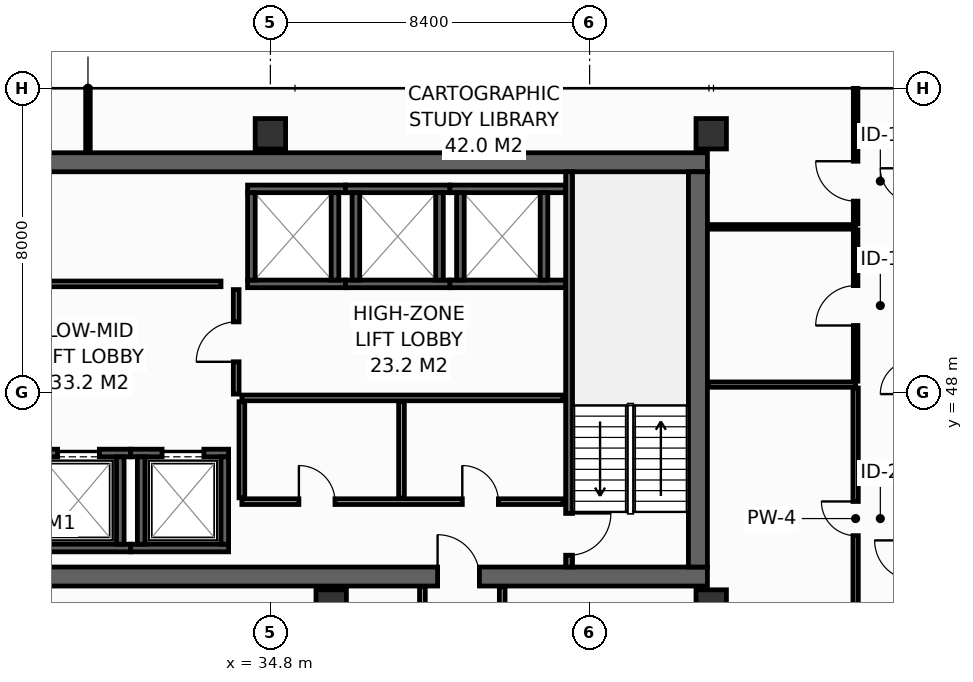
"""IFC4 building model, lengths in metres.
Left out: names, types, materials, properties, quantities, classifications, styles, units other than length and angle.
Written with IfcOpenShell. Run it as: python <this file> out.ifc"""

import sys

from ifc_helpers import new_model, si_unit, direction, frame, frame_2d, origin, origin_2d, place, context, subcontext, project, spatial, rectangle, hollow_rectangle, extrude, element, fill, save


model = new_model("IFC4")
c1 = context("Model", 3, precision=1e-05, world=origin(), true_north=direction((0.0, 1.0)))
c2 = subcontext(c1, "Body", "Model", "MODEL_VIEW")
j1 = project(units=[si_unit("LENGTHUNIT", "METRE"), si_unit("PLANEANGLEUNIT", "RADIAN")], contexts=[c1])
p1 = place(None, origin())
s1 = spatial("IfcSite", under=j1, at=p1, CompositionType="ELEMENT")
p2 = place(p1, origin())
s2 = spatial("IfcBuilding", under=s1, at=p2, CompositionType="ELEMENT")
p3 = place(p2, frame((0.0, 0.0, 190.4)))
s3 = spatial("IfcBuildingStorey", under=s2, at=p3, CompositionType="ELEMENT", Elevation=190.4)
p4 = place(p3, frame((13.6, 43.15, 0.0), z_axis=(0.0, 0.0, 1.0), x_axis=(1.0, 0.0, 0.0)))
e1 = element("IfcWall", 1, at=p4, inside=s3, PredefinedType="SHEAR", context=c2, shape_type="SweptSolid", body=[
    extrude(rectangle(XDim=32.7, YDim=0.5, at=frame_2d((16.35, 0.0))), origin(), (0.0, 0.0, 1.0), 3.55),
])
p5 = place(p4, frame((5.4, 0.0, 0.0)))
e2 = element("IfcOpeningElement", 2, at=p5, cuts=e1, PredefinedType="OPENING", context=c2, shape_type="SweptSolid", body=[
    extrude(rectangle(XDim=1.1, YDim=2.15, at=frame_2d((0.55, 1.075))), frame((0.0, 0.26, 0.0), z_axis=(0.0, -1.0, 0.0), x_axis=(1.0, 0.0, 0.0)), (0.0, 0.0, 1.0), 0.52),
])
p6 = place(p4, frame((25.6, 0.0, 0.0)))
e3 = element("IfcOpeningElement", 3, at=p6, cuts=e1, PredefinedType="OPENING", context=c2, shape_type="SweptSolid", body=[
    extrude(rectangle(XDim=1.1, YDim=2.15, at=frame_2d((0.55, 1.075))), frame((0.0, 0.26, 0.0), z_axis=(0.0, -1.0, 0.0), x_axis=(1.0, 0.0, 0.0)), (0.0, 0.0, 1.0), 0.52),
])
p7 = place(p3, frame((13.6, 54.05, 0.0), z_axis=(0.0, 0.0, 1.0), x_axis=(1.0, 0.0, 0.0)))
e4 = element("IfcWall", 4, at=p7, inside=s3, PredefinedType="SHEAR", context=c2, shape_type="SweptSolid", body=[
    extrude(rectangle(XDim=32.7, YDim=0.5, at=frame_2d((16.35, 0.0))), origin(), (0.0, 0.0, 1.0), 3.55),
])
p8 = place(p3, frame((46.05, 43.4, 0.0), z_axis=(0.0, 0.0, 1.0), x_axis=(0.0, 1.0, 0.0)))
e5 = element("IfcWall", 5, at=p8, inside=s3, PredefinedType="SHEAR", context=c2, shape_type="SweptSolid", body=[
    extrude(rectangle(XDim=10.4, YDim=0.5, at=frame_2d((5.2, 0.0))), origin(), (0.0, 0.0, 1.0), 3.55),
])
for number, where, z_axis, x_axis in (
    (6, (34.8, 54.8, 0.0), (0.0, 0.0, 1.0), (1.0, 0.0, 0.0)),
    (7, (46.4, 54.8, 0.0), (0.0, 0.0, 1.0), (1.0, 0.0, 0.0)),
    (8, (36.4, 42.4, 0.0), (0.0, 0.0, 1.0), (1.0, 0.0, 0.0)),
    (9, (46.4, 42.4, 0.0), (0.0, 0.0, 1.0), (1.0, 0.0, 0.0)),
):
    element("IfcColumn", number, at=place(p3, frame(where, z_axis=z_axis, x_axis=x_axis)), inside=s3, PredefinedType="COLUMN", context=c2, shape_type="SweptSolid", body=[
        extrude(hollow_rectangle(XDim=0.8, YDim=0.8, WallThickness=0.036, at=origin_2d()), origin(), (0.0, 0.0, 1.0), 3.8),
    ])
p9 = place(p3, frame((28.375, 43.9, 0.0), z_axis=(0.0, 0.0, 1.0), x_axis=(1.0, 0.0, 0.0)))
e10 = element("IfcWall", 10, at=p9, inside=s3, PredefinedType="SHEAR", context=c2, shape_type="SweptSolid", body=[
    extrude(rectangle(XDim=2.75, YDim=0.2, at=frame_2d((1.375, 0.0))), origin(), (0.0, 0.0, 1.0), 3.55),
])
p10 = place(p3, frame((28.375, 46.4, 0.0), z_axis=(0.0, 0.0, 1.0), x_axis=(1.0, 0.0, 0.0)))
e11 = element("IfcWall", 11, at=p10, inside=s3, PredefinedType="SHEAR", context=c2, shape_type="SweptSolid", body=[
    extrude(rectangle(XDim=2.75, YDim=0.2, at=frame_2d((1.375, 0.0))), origin(), (0.0, 0.0, 1.0), 3.55),
])
p11 = place(p10, frame((0.825, 0.0, 0.0)))
e12 = element("IfcOpeningElement", 12, at=p11, cuts=e11, PredefinedType="OPENING", context=c2, shape_type="SweptSolid", body=[
    extrude(rectangle(XDim=1.1, YDim=2.2, at=frame_2d((0.55, 1.1))), frame((0.0, 0.11, 0.0), z_axis=(0.0, -1.0, 0.0), x_axis=(1.0, 0.0, 0.0)), (0.0, 0.0, 1.0), 0.22),
])
p12 = place(p3, frame((30.85, 44.0, 0.0), z_axis=(0.0, 0.0, 1.0), x_axis=(0.0, 1.0, 0.0)))
e13 = element("IfcWall", 13, at=p12, inside=s3, PredefinedType="SHEAR", context=c2, shape_type="SweptSolid", body=[
    extrude(rectangle(XDim=2.3, YDim=0.2, at=frame_2d((1.15, 0.0))), origin(), (0.0, 0.0, 1.0), 3.55),
])
p13 = place(p3, frame((31.125, 43.9, 0.0), z_axis=(0.0, 0.0, 1.0), x_axis=(1.0, 0.0, 0.0)))
e14 = element("IfcWall", 14, at=p13, inside=s3, PredefinedType="SHEAR", context=c2, shape_type="SweptSolid", body=[
    extrude(rectangle(XDim=2.575, YDim=0.2, at=frame_2d((1.288, 0.0))), origin(), (0.0, 0.0, 1.0), 3.55),
])
p14 = place(p3, frame((31.125, 46.4, 0.0), z_axis=(0.0, 0.0, 1.0), x_axis=(1.0, 0.0, 0.0)))
e15 = element("IfcWall", 15, at=p14, inside=s3, PredefinedType="SHEAR", context=c2, shape_type="SweptSolid", body=[
    extrude(rectangle(XDim=2.575, YDim=0.2, at=frame_2d((1.288, 0.0))), origin(), (0.0, 0.0, 1.0), 3.55),
])
p15 = place(p14, frame((0.825, 0.0, 0.0)))
e16 = element("IfcOpeningElement", 16, at=p15, cuts=e15, PredefinedType="OPENING", context=c2, shape_type="SweptSolid", body=[
    extrude(rectangle(XDim=1.1, YDim=2.2, at=frame_2d((0.55, 1.1))), frame((0.0, 0.11, 0.0), z_axis=(0.0, -1.0, 0.0), x_axis=(1.0, 0.0, 0.0)), (0.0, 0.0, 1.0), 0.22),
])
for number, where, z_axis, x_axis in (
    (17, (31.4, 44.0, 0.0), (0.0, 0.0, 1.0), (0.0, 1.0, 0.0)),
    (18, (33.6, 44.0, 0.0), (0.0, 0.0, 1.0), (0.0, 1.0, 0.0)),
):
    element("IfcWall", number, at=place(p3, frame(where, z_axis=z_axis, x_axis=x_axis)), inside=s3, PredefinedType="SHEAR", context=c2, shape_type="SweptSolid", body=[
        extrude(rectangle(XDim=2.3, YDim=0.2, at=frame_2d((1.15, 0.0))), origin(), (0.0, 0.0, 1.0), 3.55),
    ])
for number, where, z_axis, x_axis in (
    (19, (34.2, 50.85, 0.0), (0.0, 0.0, 1.0), (1.0, 0.0, 0.0)),
    (20, (34.2, 53.35, 0.0), (0.0, 0.0, 1.0), (1.0, 0.0, 0.0)),
):
    element("IfcWall", number, at=place(p3, frame(where, z_axis=z_axis, x_axis=x_axis)), inside=s3, PredefinedType="SHEAR", context=c2, shape_type="SweptSolid", body=[
        extrude(rectangle(XDim=2.575, YDim=0.2, at=frame_2d((1.288, 0.0))), origin(), (0.0, 0.0, 1.0), 3.55),
    ])
for number, where, z_axis, x_axis in (
    (21, (34.3, 50.95, 0.0), (0.0, 0.0, 1.0), (0.0, 1.0, 0.0)),
    (22, (36.5, 50.95, 0.0), (0.0, 0.0, 1.0), (0.0, 1.0, 0.0)),
):
    element("IfcWall", number, at=place(p3, frame(where, z_axis=z_axis, x_axis=x_axis)), inside=s3, PredefinedType="SHEAR", context=c2, shape_type="SweptSolid", body=[
        extrude(rectangle(XDim=2.3, YDim=0.2, at=frame_2d((1.15, 0.0))), origin(), (0.0, 0.0, 1.0), 3.55),
    ])
for number, where, z_axis, x_axis in (
    (23, (36.775, 50.85, 0.0), (0.0, 0.0, 1.0), (1.0, 0.0, 0.0)),
    (24, (36.775, 53.35, 0.0), (0.0, 0.0, 1.0), (1.0, 0.0, 0.0)),
):
    element("IfcWall", number, at=place(p3, frame(where, z_axis=z_axis, x_axis=x_axis)), inside=s3, PredefinedType="SHEAR", context=c2, shape_type="SweptSolid", body=[
        extrude(rectangle(XDim=2.75, YDim=0.2, at=frame_2d((1.375, 0.0))), origin(), (0.0, 0.0, 1.0), 3.55),
    ])
for number, where, z_axis, x_axis in (
    (25, (37.05, 50.95, 0.0), (0.0, 0.0, 1.0), (0.0, 1.0, 0.0)),
    (26, (39.25, 50.95, 0.0), (0.0, 0.0, 1.0), (0.0, 1.0, 0.0)),
):
    element("IfcWall", number, at=place(p3, frame(where, z_axis=z_axis, x_axis=x_axis)), inside=s3, PredefinedType="SHEAR", context=c2, shape_type="SweptSolid", body=[
        extrude(rectangle(XDim=2.3, YDim=0.2, at=frame_2d((1.15, 0.0))), origin(), (0.0, 0.0, 1.0), 3.55),
    ])
for number, where, z_axis, x_axis in (
    (27, (39.525, 50.85, 0.0), (0.0, 0.0, 1.0), (1.0, 0.0, 0.0)),
    (28, (39.525, 53.35, 0.0), (0.0, 0.0, 1.0), (1.0, 0.0, 0.0)),
):
    element("IfcWall", number, at=place(p3, frame(where, z_axis=z_axis, x_axis=x_axis)), inside=s3, PredefinedType="SHEAR", context=c2, shape_type="SweptSolid", body=[
        extrude(rectangle(XDim=3.045, YDim=0.2, at=frame_2d((1.522, 0.0))), origin(), (0.0, 0.0, 1.0), 3.55),
    ])
for number, where, z_axis, x_axis in (
    (29, (39.8, 50.95, 0.0), (0.0, 0.0, 1.0), (0.0, 1.0, 0.0)),
    (30, (42.0, 50.95, 0.0), (0.0, 0.0, 1.0), (0.0, 1.0, 0.0)),
):
    element("IfcWall", number, at=place(p3, frame(where, z_axis=z_axis, x_axis=x_axis)), inside=s3, PredefinedType="SHEAR", context=c2, shape_type="SweptSolid", body=[
        extrude(rectangle(XDim=2.3, YDim=0.2, at=frame_2d((1.15, 0.0))), origin(), (0.0, 0.0, 1.0), 3.55),
    ])
p16 = place(p3, frame((42.66, 53.8, 0.0), z_axis=(0.0, 0.0, 1.0), x_axis=(0.0, -1.0, 0.0)))
e31 = element("IfcWall", 31, at=p16, inside=s3, PredefinedType="SHEAR", context=c2, shape_type="SweptSolid", body=[
    extrude(rectangle(XDim=10.4, YDim=0.18, at=frame_2d((5.2, 0.0))), origin(), (0.0, 0.0, 1.0), 3.55),
])
p17 = place(p16, frame((8.99, 0.0, 0.0)))
e32 = element("IfcOpeningElement", 32, at=p17, cuts=e31, PredefinedType="OPENING", context=c2, shape_type="SweptSolid", body=[
    extrude(rectangle(XDim=1.1, YDim=2.15, at=frame_2d((0.55, 1.075))), frame((0.0, 0.1, 0.0), z_axis=(0.0, -1.0, 0.0), x_axis=(1.0, 0.0, 0.0)), (0.0, 0.0, 1.0), 0.2),
])
p18 = place(p3, frame((33.9, 47.95, 0.0), z_axis=(0.0, 0.0, 1.0), x_axis=(0.0, 1.0, 0.0)))
e33 = element("IfcWall", 33, at=p18, inside=s3, PredefinedType="PARTITIONING", context=c2, shape_type="SweptSolid", body=[
    extrude(rectangle(XDim=2.75, YDim=0.15, at=frame_2d((1.375, 0.0))), origin(), (0.0, 0.0, 1.0), 3.55),
])
p19 = place(p18, frame((0.85, 0.0, 0.0)))
e34 = element("IfcOpeningElement", 34, at=p19, cuts=e33, PredefinedType="OPENING", context=c2, shape_type="SweptSolid", body=[
    extrude(rectangle(XDim=1.05, YDim=2.15, at=frame_2d((0.525, 1.075))), frame((0.0, 0.085, 0.0), z_axis=(0.0, -1.0, 0.0), x_axis=(1.0, 0.0, 0.0)), (0.0, 0.0, 1.0), 0.17),
])
p20 = place(p3, frame((34.05, 45.12, 0.0), z_axis=(0.0, 0.0, 1.0), x_axis=(1.0, 0.0, 0.0)))
e35 = element("IfcWall", 35, at=p20, inside=s3, PredefinedType="PARTITIONING", context=c2, shape_type="SweptSolid", body=[
    extrude(rectangle(XDim=8.45, YDim=0.15, at=frame_2d((4.225, 0.0))), origin(), (0.0, 0.0, 1.0), 3.55),
])
p21 = place(p20, frame((1.5, 0.0, 0.0)))
e36 = element("IfcOpeningElement", 36, at=p21, cuts=e35, PredefinedType="OPENING", context=c2, shape_type="SweptSolid", body=[
    extrude(rectangle(XDim=0.95, YDim=2.15, at=frame_2d((0.475, 1.075))), frame((0.0, 0.085, 0.0), z_axis=(0.0, -1.0, 0.0), x_axis=(1.0, 0.0, 0.0)), (0.0, 0.0, 1.0), 0.17),
])
p22 = place(p20, frame((5.8, 0.0, 0.0)))
e37 = element("IfcOpeningElement", 37, at=p22, cuts=e35, PredefinedType="OPENING", context=c2, shape_type="SweptSolid", body=[
    extrude(rectangle(XDim=0.95, YDim=2.15, at=frame_2d((0.475, 1.075))), frame((0.0, 0.085, 0.0), z_axis=(0.0, -1.0, 0.0), x_axis=(1.0, 0.0, 0.0)), (0.0, 0.0, 1.0), 0.17),
])
p23 = place(p3, frame((34.05, 47.85, 0.0), z_axis=(0.0, 0.0, 1.0), x_axis=(1.0, 0.0, 0.0)))
e38 = element("IfcWall", 38, at=p23, inside=s3, PredefinedType="PARTITIONING", context=c2, shape_type="SweptSolid", body=[
    extrude(rectangle(XDim=8.45, YDim=0.15, at=frame_2d((4.225, 0.0))), origin(), (0.0, 0.0, 1.0), 3.55),
])
for number, where, z_axis, x_axis in (
    (39, (38.25, 45.22, 0.0), (0.0, 0.0, 1.0), (0.0, 1.0, 0.0)),
    (40, (34.05, 45.22, 0.0), (0.0, 0.0, 1.0), (0.0, 1.0, 0.0)),
):
    element("IfcWall", number, at=place(p3, frame(where, z_axis=z_axis, x_axis=x_axis)), inside=s3, PredefinedType="PARTITIONING", context=c2, shape_type="SweptSolid", body=[
        extrude(rectangle(XDim=2.53, YDim=0.15, at=frame_2d((1.265, 0.0))), origin(), (0.0, 0.0, 1.0), 3.55),
    ])
p24 = place(p3, frame((25.85, 50.85, 0.0), z_axis=(0.0, 0.0, 1.0), x_axis=(1.0, 0.0, 0.0)))
e41 = element("IfcWall", 41, at=p24, inside=s3, PredefinedType="PARTITIONING", context=c2, shape_type="SweptSolid", body=[
    extrude(rectangle(XDim=7.65, YDim=0.15, at=frame_2d((3.825, 0.0))), origin(), (0.0, 0.0, 1.0), 3.55),
])
p25 = place(p24, frame((1.25, 0.0, 0.0)))
e42 = element("IfcOpeningElement", 42, at=p25, cuts=e41, PredefinedType="OPENING", context=c2, shape_type="SweptSolid", body=[
    extrude(rectangle(XDim=0.95, YDim=2.15, at=frame_2d((0.475, 1.075))), frame((0.0, 0.085, 0.0), z_axis=(0.0, -1.0, 0.0), x_axis=(1.0, 0.0, 0.0)), (0.0, 0.0, 1.0), 0.17),
])
p26 = place(p3, frame((46.15, 41.24, 0.0), z_axis=(0.0, 0.0, 1.0), x_axis=(0.0, 1.0, 0.0)))
e43 = element("IfcWall", 43, at=p26, inside=s3, PredefinedType="PARTITIONING", context=c2, shape_type="SweptSolid", body=[
    extrude(rectangle(XDim=1.64, YDim=0.14, at=frame_2d((0.82, 0.0))), origin(), (0.0, 0.0, 1.0), 3.55),
])
p27 = place(p3, frame((46.32, 48.2, 0.0), z_axis=(0.0, 0.0, 1.0), x_axis=(1.0, 0.0, 0.0)))
e44 = element("IfcWall", 44, at=p27, inside=s3, PredefinedType="PARTITIONING", context=c2, shape_type="SweptSolid", body=[
    extrude(rectangle(XDim=3.88, YDim=0.14, at=frame_2d((1.94, 0.0))), origin(), (0.0, 0.0, 1.0), 3.55),
])
p28 = place(p3, frame((50.2, 41.24, 0.0), z_axis=(0.0, 0.0, 1.0), x_axis=(0.0, 1.0, 0.0)))
e45 = element("IfcWall", 45, at=p28, inside=s3, PredefinedType="PARTITIONING", context=c2, shape_type="SweptSolid", body=[
    extrude(rectangle(XDim=6.87, YDim=0.14, at=frame_2d((3.435, 0.0))), origin(), (0.0, 0.0, 1.0), 2.835),
])
p29 = place(p28, frame((2.985, 0.0, 0.0)))
e46 = element("IfcOpeningElement", 46, at=p29, cuts=e45, PredefinedType="OPENING", context=c2, shape_type="SweptSolid", body=[
    extrude(rectangle(XDim=0.9, YDim=2.1, at=frame_2d((0.45, 1.05))), frame((0.0, 0.08, 0.0), z_axis=(0.0, -1.0, 0.0), x_axis=(1.0, 0.0, 0.0)), (0.0, 0.0, 1.0), 0.16),
])
p30 = place(p3, frame((46.32, 52.35, 0.0), z_axis=(0.0, 0.0, 1.0), x_axis=(1.0, 0.0, 0.0)))
e47 = element("IfcWall", 47, at=p30, inside=s3, PredefinedType="PARTITIONING", context=c2, shape_type="SweptSolid", body=[
    extrude(rectangle(XDim=3.88, YDim=0.12, at=frame_2d((1.94, 0.0))), origin(), (0.0, 0.0, 1.0), 3.55),
])
p31 = place(p3, frame((30.0, 54.32, 0.0), z_axis=(0.0, 0.0, 1.0), x_axis=(0.0, 1.0, 0.0)))
e48 = element("IfcWall", 48, at=p31, inside=s3, PredefinedType="PARTITIONING", context=c2, shape_type="SweptSolid", body=[
    extrude(rectangle(XDim=1.675, YDim=0.12, at=frame_2d((0.837, 0.0))), origin(), (0.0, 0.0, 1.0), 2.935),
])
p32 = place(p3, frame((50.2, 48.29, 0.0), z_axis=(0.0, 0.0, 1.0), x_axis=(0.0, 1.0, 0.0)))
e49 = element("IfcWall", 49, at=p32, inside=s3, PredefinedType="PARTITIONING", context=c2, shape_type="SweptSolid", body=[
    extrude(rectangle(XDim=3.98, YDim=0.12, at=frame_2d((1.99, 0.0))), origin(), (0.0, 0.0, 1.0), 3.55),
])
p33 = place(p32, frame((1.465, 0.0, 0.0)))
e50 = element("IfcOpeningElement", 50, at=p33, cuts=e49, PredefinedType="OPENING", context=c2, shape_type="SweptSolid", body=[
    extrude(rectangle(XDim=1.05, YDim=2.15, at=frame_2d((0.525, 1.075))), frame((0.0, 0.07, 0.0), z_axis=(0.0, -1.0, 0.0), x_axis=(1.0, 0.0, 0.0)), (0.0, 0.0, 1.0), 0.14),
])
p34 = place(p3, frame((50.2, 52.43, 0.0), z_axis=(0.0, 0.0, 1.0), x_axis=(0.0, 1.0, 0.0)))
e51 = element("IfcWall", 51, at=p34, inside=s3, PredefinedType="PARTITIONING", context=c2, shape_type="SweptSolid", body=[
    extrude(rectangle(XDim=3.565, YDim=0.12, at=frame_2d((1.783, 0.0))), origin(), (0.0, 0.0, 1.0), 2.935),
])
p35 = place(p34, frame((0.597, 0.0, 0.0)))
e52 = element("IfcOpeningElement", 52, at=p35, cuts=e51, PredefinedType="OPENING", context=c2, shape_type="SweptSolid", body=[
    extrude(rectangle(XDim=1.05, YDim=2.15, at=frame_2d((0.525, 1.075))), frame((0.0, 0.07, 0.0), z_axis=(0.0, -1.0, 0.0), x_axis=(1.0, 0.0, 0.0)), (0.0, 0.0, 1.0), 0.14),
])
for number, where, z_axis, x_axis in (
    (53, (38.8, 41.15, 0.0), (0.0, 0.0, 1.0), (0.0, 1.0, 0.0)),
    (54, (40.9, 41.15, 0.0), (0.0, 0.0, 1.0), (0.0, 1.0, 0.0)),
):
    element("IfcWall", number, at=place(p3, frame(where, z_axis=z_axis, x_axis=x_axis)), inside=s3, PredefinedType="PARTITIONING", context=c2, shape_type="SweptSolid", body=[
        extrude(rectangle(XDim=1.73, YDim=0.15, at=frame_2d((0.865, 0.0))), origin(), (0.0, 0.0, 1.0), 3.55),
    ])
p36 = place(p11, origin())
e55 = element("IfcDoor", 55, at=p36, inside=s3, OperationType="SLIDING_TO_LEFT", PredefinedType="DOOR", context=c2, shape_type="SweptSolid", body=[
    extrude(rectangle(XDim=1.1, YDim=2.2, at=frame_2d((0.55, 1.1))), frame((0.0, 0.025, 0.0), z_axis=(0.0, -1.0, 0.0), x_axis=(1.0, 0.0, 0.0)), (0.0, 0.0, 1.0), 0.05),
])
fill(e12, e55)
p37 = place(p15, origin())
e56 = element("IfcDoor", 56, at=p37, inside=s3, OperationType="SLIDING_TO_LEFT", PredefinedType="DOOR", context=c2, shape_type="SweptSolid", body=[
    extrude(rectangle(XDim=1.1, YDim=2.2, at=frame_2d((0.55, 1.1))), frame((0.0, 0.025, 0.0), z_axis=(0.0, -1.0, 0.0), x_axis=(1.0, 0.0, 0.0)), (0.0, 0.0, 1.0), 0.05),
])
fill(e16, e56)
p38 = place(p17, origin())
e57 = element("IfcDoor", 57, at=p38, inside=s3, OperationType="SINGLE_SWING_LEFT", PredefinedType="DOOR", context=c2, shape_type="SweptSolid", body=[
    extrude(rectangle(XDim=1.1, YDim=2.15, at=frame_2d((0.55, 1.075))), frame((0.0, 0.025, 0.0), z_axis=(0.0, -1.0, 0.0), x_axis=(1.0, 0.0, 0.0)), (0.0, 0.0, 1.0), 0.05),
])
fill(e32, e57)
p39 = place(p6, origin())
e58 = element("IfcDoor", 58, at=p39, inside=s3, OperationType="SINGLE_SWING_LEFT", PredefinedType="DOOR", context=c2, shape_type="SweptSolid", body=[
    extrude(rectangle(XDim=1.1, YDim=2.15, at=frame_2d((0.55, 1.075))), frame((0.0, 0.025, 0.0), z_axis=(0.0, -1.0, 0.0), x_axis=(1.0, 0.0, 0.0)), (0.0, 0.0, 1.0), 0.05),
])
fill(e3, e58)
p40 = place(p19, origin())
e59 = element("IfcDoor", 59, at=p40, inside=s3, OperationType="SINGLE_SWING_LEFT", PredefinedType="DOOR", context=c2, shape_type="SweptSolid", body=[
    extrude(rectangle(XDim=1.05, YDim=2.15, at=frame_2d((0.525, 1.075))), frame((0.0, 0.025, 0.0), z_axis=(0.0, -1.0, 0.0), x_axis=(1.0, 0.0, 0.0)), (0.0, 0.0, 1.0), 0.05),
])
fill(e34, e59)
p41 = place(p21, origin())
e60 = element("IfcDoor", 60, at=p41, inside=s3, OperationType="SINGLE_SWING_LEFT", PredefinedType="DOOR", context=c2, shape_type="SweptSolid", body=[
    extrude(rectangle(XDim=0.95, YDim=2.15, at=frame_2d((0.475, 1.075))), frame((0.0, 0.025, 0.0), z_axis=(0.0, -1.0, 0.0), x_axis=(1.0, 0.0, 0.0)), (0.0, 0.0, 1.0), 0.05),
])
fill(e36, e60)
p42 = place(p22, origin())
e61 = element("IfcDoor", 61, at=p42, inside=s3, OperationType="SINGLE_SWING_LEFT", PredefinedType="DOOR", context=c2, shape_type="SweptSolid", body=[
    extrude(rectangle(XDim=0.95, YDim=2.15, at=frame_2d((0.475, 1.075))), frame((0.0, 0.025, 0.0), z_axis=(0.0, -1.0, 0.0), x_axis=(1.0, 0.0, 0.0)), (0.0, 0.0, 1.0), 0.05),
])
fill(e37, e61)
p43 = place(p29, origin())
e62 = element("IfcDoor", 62, at=p43, inside=s3, OperationType="SINGLE_SWING_RIGHT", PredefinedType="DOOR", context=c2, shape_type="SweptSolid", body=[
    extrude(rectangle(XDim=0.9, YDim=2.1, at=frame_2d((0.45, 1.05))), frame((0.0, 0.025, 0.0), z_axis=(0.0, -1.0, 0.0), x_axis=(1.0, 0.0, 0.0)), (0.0, 0.0, 1.0), 0.05),
])
fill(e46, e62)
p44 = place(p33, origin())
e63 = element("IfcDoor", 63, at=p44, inside=s3, OperationType="SINGLE_SWING_LEFT", PredefinedType="DOOR", context=c2, shape_type="SweptSolid", body=[
    extrude(rectangle(XDim=1.05, YDim=2.15, at=frame_2d((0.525, 1.075))), frame((0.0, 0.025, 0.0), z_axis=(0.0, -1.0, 0.0), x_axis=(1.0, 0.0, 0.0)), (0.0, 0.0, 1.0), 0.05),
])
fill(e50, e63)
p45 = place(p35, origin())
e64 = element("IfcDoor", 64, at=p45, inside=s3, OperationType="SINGLE_SWING_RIGHT", PredefinedType="DOOR", context=c2, shape_type="SweptSolid", body=[
    extrude(rectangle(XDim=1.05, YDim=2.15, at=frame_2d((0.525, 1.075))), frame((0.0, 0.025, 0.0), z_axis=(0.0, -1.0, 0.0), x_axis=(1.0, 0.0, 0.0)), (0.0, 0.0, 1.0), 0.05),
])
fill(e52, e64)
save(model, sys.argv[1])
